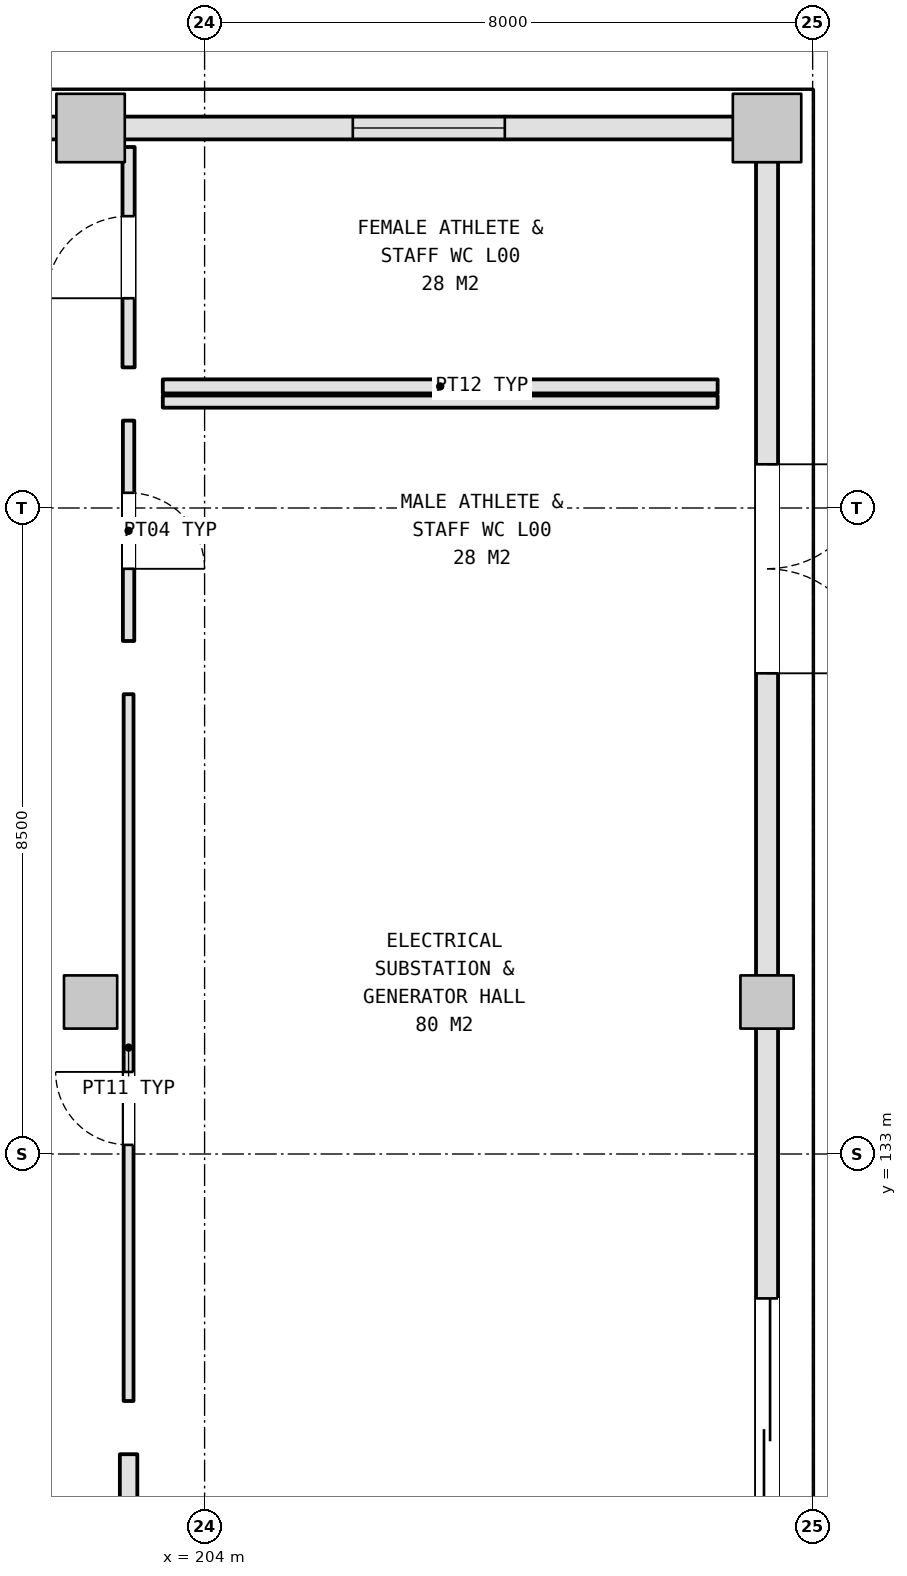
"""IFC4 building model, lengths in metres.
Left out: names, types, materials, properties, quantities, classifications, styles, units other than length and angle.
Written with IfcOpenShell. Run it as: python <this file> out.ifc"""

import sys

from ifc_helpers import new_model, si_unit, direction, frame, frame_2d, origin, origin_2d, place, context, subcontext, project, spatial, rectangle, extrude, element, fill, save


model = new_model("IFC4")
c1 = context("Model", 3, precision=1e-05, world=origin(), true_north=direction((0.0, 1.0)))
c2 = subcontext(c1, "Body", "Model", "MODEL_VIEW")
j1 = project(units=[si_unit("LENGTHUNIT", "METRE"), si_unit("PLANEANGLEUNIT", "RADIAN")], contexts=[c1])
p1 = place(None, origin())
s1 = spatial("IfcSite", under=j1, at=p1, CompositionType="ELEMENT")
p2 = place(p1, origin())
s2 = spatial("IfcBuilding", under=s1, at=p2, CompositionType="ELEMENT")
p3 = place(p2, origin())
s3 = spatial("IfcBuildingStorey", under=s2, at=p3, CompositionType="ELEMENT", Elevation=0.0)
p4 = place(p3, frame((202.5, 135.0, 0.0), z_axis=(0.0, 0.0, 1.0), x_axis=(1.0, 0.0, 0.0)))
e1 = element("IfcColumn", 1, at=p4, inside=s3, PredefinedType="COLUMN", context=c2, shape_type="SweptSolid", body=[
    extrude(rectangle(XDim=0.7, YDim=0.7, at=origin_2d()), origin(), (0.0, 0.0, 1.0), 5.4),
])
p5 = place(p3, frame((202.5, 146.5, 0.0), z_axis=(0.0, 0.0, 1.0), x_axis=(1.0, 0.0, 0.0)))
e2 = element("IfcColumn", 2, at=p5, inside=s3, PredefinedType="COLUMN", context=c2, shape_type="SweptSolid", body=[
    extrude(rectangle(XDim=0.9, YDim=0.9, at=origin_2d()), origin(), (0.0, 0.0, 1.0), 5.4),
])
p6 = place(p3, frame((211.4, 135.0, 0.0), z_axis=(0.0, 0.0, 1.0), x_axis=(1.0, 0.0, 0.0)))
e3 = element("IfcColumn", 3, at=p6, inside=s3, PredefinedType="COLUMN", context=c2, shape_type="SweptSolid", body=[
    extrude(rectangle(XDim=0.7, YDim=0.7, at=origin_2d()), origin(), (0.0, 0.0, 1.0), 5.4),
])
p7 = place(p3, frame((211.4, 146.5, 0.0), z_axis=(0.0, 0.0, 1.0), x_axis=(1.0, 0.0, 0.0)))
e4 = element("IfcColumn", 4, at=p7, inside=s3, PredefinedType="COLUMN", context=c2, shape_type="SweptSolid", body=[
    extrude(rectangle(XDim=0.9, YDim=0.9, at=origin_2d()), origin(), (0.0, 0.0, 1.0), 5.4),
])
p8 = place(p3, frame((211.4, 123.938, 0.0), z_axis=(0.0, 0.0, 1.0), x_axis=(0.0, 1.0, 0.0)))
e5 = element("IfcWall", 5, at=p8, inside=s3, PredefinedType="SOLIDWALL", context=c2, shape_type="SweptSolid", body=[
    extrude(rectangle(XDim=10.724, YDim=0.29, at=frame_2d((5.362, 0.0))), origin(), (0.0, 0.0, 1.0), 4.475),
])
p9 = place(p8, frame((3.562, 0.0, 0.0)))
e6 = element("IfcOpeningElement", 6, at=p9, cuts=e5, PredefinedType="OPENING", context=c2, shape_type="SweptSolid", body=[
    extrude(rectangle(XDim=3.6, YDim=4.0, at=frame_2d((1.8, 2.0))), frame((0.0, 0.155, 0.0), z_axis=(0.0, -1.0, 0.0), x_axis=(1.0, 0.0, 0.0)), (0.0, 0.0, 1.0), 0.31),
])
p10 = place(p3, frame((211.4, 135.338, 0.0), z_axis=(0.0, 0.0, 1.0), x_axis=(0.0, 1.0, 0.0)))
e7 = element("IfcWall", 7, at=p10, inside=s3, PredefinedType="SOLIDWALL", context=c2, shape_type="SweptSolid", body=[
    extrude(rectangle(XDim=10.724, YDim=0.29, at=frame_2d((5.362, 0.0))), origin(), (0.0, 0.0, 1.0), 4.475),
])
p11 = place(p10, frame((3.987, 0.0, 0.0)))
e8 = element("IfcOpeningElement", 8, at=p11, cuts=e7, PredefinedType="OPENING", context=c2, shape_type="SweptSolid", body=[
    extrude(rectangle(XDim=2.75, YDim=2.4, at=frame_2d((1.375, 1.2))), frame((0.0, 0.155, 0.0), z_axis=(0.0, -1.0, 0.0), x_axis=(1.0, 0.0, 0.0)), (0.0, 0.0, 1.0), 0.31),
])
p12 = place(p3, frame((194.038, 146.5, 0.0), z_axis=(0.0, 0.0, 1.0), x_axis=(1.0, 0.0, 0.0)))
e9 = element("IfcWall", 9, at=p12, inside=s3, PredefinedType="SOLIDWALL", context=c2, shape_type="SweptSolid", body=[
    extrude(rectangle(XDim=8.024, YDim=0.3, at=frame_2d((4.012, 0.0))), origin(), (0.0, 0.0, 1.0), 4.715),
])
p13 = place(p12, frame((3.012, 0.0, 1.05)))
e10 = element("IfcOpeningElement", 10, at=p13, cuts=e9, PredefinedType="OPENING", context=c2, shape_type="SweptSolid", body=[
    extrude(rectangle(XDim=2.0, YDim=1.7, at=frame_2d((1.0, 0.85))), frame((0.0, 0.16, 0.0), z_axis=(0.0, -1.0, 0.0), x_axis=(1.0, 0.0, 0.0)), (0.0, 0.0, 1.0), 0.32),
])
p14 = place(p3, frame((202.938, 146.5, 0.0), z_axis=(0.0, 0.0, 1.0), x_axis=(1.0, 0.0, 0.0)))
e11 = element("IfcWall", 11, at=p14, inside=s3, PredefinedType="SOLIDWALL", context=c2, shape_type="SweptSolid", body=[
    extrude(rectangle(XDim=8.024, YDim=0.3, at=frame_2d((4.012, 0.0))), origin(), (0.0, 0.0, 1.0), 4.715),
])
p15 = place(p14, frame((3.012, 0.0, 1.05)))
e12 = element("IfcOpeningElement", 12, at=p15, cuts=e11, PredefinedType="OPENING", context=c2, shape_type="SweptSolid", body=[
    extrude(rectangle(XDim=2.0, YDim=1.7, at=frame_2d((1.0, 0.85))), frame((0.0, 0.16, 0.0), z_axis=(0.0, -1.0, 0.0), x_axis=(1.0, 0.0, 0.0)), (0.0, 0.0, 1.0), 0.32),
])
p16 = place(p3, frame((203.0, 117.75, 0.0), z_axis=(0.0, 0.0, 1.0), x_axis=(0.0, 1.0, 0.0)))
e13 = element("IfcWall", 13, at=p16, inside=s3, PredefinedType="PLUMBINGWALL", context=c2, shape_type="SweptSolid", body=[
    extrude(rectangle(XDim=11.3, YDim=0.23, at=frame_2d((5.65, 0.0))), origin(), (0.0, 0.0, 1.0), 4.625),
])
p17 = place(p16, frame((3.96, 0.0, 0.0)))
e14 = element("IfcOpeningElement", 14, at=p17, cuts=e13, PredefinedType="OPENING", context=c2, shape_type="SweptSolid", body=[
    extrude(rectangle(XDim=0.98, YDim=2.15, at=frame_2d((0.49, 1.075))), frame((0.0, 0.125, 0.0), z_axis=(0.0, -1.0, 0.0), x_axis=(1.0, 0.0, 0.0)), (0.0, 0.0, 1.0), 0.25),
])
p18 = place(p3, frame((203.0, 129.75, 0.0), z_axis=(0.0, 0.0, 1.0), x_axis=(0.0, 1.0, 0.0)))
e15 = element("IfcWall", 15, at=p18, inside=s3, PredefinedType="PARTITIONING", context=c2, shape_type="SweptSolid", body=[
    extrude(rectangle(XDim=9.3, YDim=0.13, at=frame_2d((4.65, 0.0))), origin(), (0.0, 0.0, 1.0), 4.715),
])
p19 = place(p18, frame((3.37, 0.0, 0.0)))
e16 = element("IfcOpeningElement", 16, at=p19, cuts=e15, PredefinedType="OPENING", context=c2, shape_type="SweptSolid", body=[
    extrude(rectangle(XDim=0.96, YDim=2.15, at=frame_2d((0.48, 1.075))), frame((0.0, 0.075, 0.0), z_axis=(0.0, -1.0, 0.0), x_axis=(1.0, 0.0, 0.0)), (0.0, 0.0, 1.0), 0.15),
])
p20 = place(p3, frame((203.0, 139.75, 0.0), z_axis=(0.0, 0.0, 1.0), x_axis=(0.0, 1.0, 0.0)))
e17 = element("IfcWall", 17, at=p20, inside=s3, PredefinedType="PARTITIONING", context=c2, shape_type="SweptSolid", body=[
    extrude(rectangle(XDim=2.9, YDim=0.15, at=frame_2d((1.45, 0.0))), origin(), (0.0, 0.0, 1.0), 4.625),
])
p21 = place(p20, frame((0.95, 0.0, 0.0)))
e18 = element("IfcOpeningElement", 18, at=p21, cuts=e17, PredefinedType="OPENING", context=c2, shape_type="SweptSolid", body=[
    extrude(rectangle(XDim=1.0, YDim=2.15, at=frame_2d((0.5, 1.075))), frame((0.0, 0.085, 0.0), z_axis=(0.0, -1.0, 0.0), x_axis=(1.0, 0.0, 0.0)), (0.0, 0.0, 1.0), 0.17),
])
p22 = place(p3, frame((203.45, 142.9, 0.0), z_axis=(0.0, 0.0, 1.0), x_axis=(1.0, 0.0, 0.0)))
e19 = element("IfcWall", 19, at=p22, inside=s3, PredefinedType="PARTITIONING", context=c2, shape_type="SweptSolid", body=[
    extrude(rectangle(XDim=7.3, YDim=0.16, at=frame_2d((3.65, 0.0))), origin(), (0.0, 0.0, 1.0), 5.12),
])
p23 = place(p3, frame((203.0, 143.35, 0.0), z_axis=(0.0, 0.0, 1.0), x_axis=(0.0, 1.0, 0.0)))
e20 = element("IfcWall", 20, at=p23, inside=s3, PredefinedType="PARTITIONING", context=c2, shape_type="SweptSolid", body=[
    extrude(rectangle(XDim=2.9, YDim=0.16, at=frame_2d((1.45, 0.0))), origin(), (0.0, 0.0, 1.0), 5.12),
])
p24 = place(p23, frame((0.91, 0.0, 0.0)))
e21 = element("IfcOpeningElement", 21, at=p24, cuts=e20, PredefinedType="OPENING", context=c2, shape_type="SweptSolid", body=[
    extrude(rectangle(XDim=1.08, YDim=2.25, at=frame_2d((0.54, 1.125))), frame((0.0, 0.09, 0.0), z_axis=(0.0, -1.0, 0.0), x_axis=(1.0, 0.0, 0.0)), (0.0, 0.0, 1.0), 0.18),
])
p25 = place(p3, frame((210.75, 143.1, 0.0), z_axis=(0.0, 0.0, 1.0), x_axis=(-1.0, 0.0, 0.0)))
e22 = element("IfcWall", 22, at=p25, inside=s3, PredefinedType="PARTITIONING", context=c2, shape_type="SweptSolid", body=[
    extrude(rectangle(XDim=7.3, YDim=0.185, at=frame_2d((3.65, 0.0))), origin(), (0.0, 0.0, 1.0), 5.12),
])
p26 = place(p9, frame((3.6, 0.0, 0.0), z_axis=(0.0, 0.0, 1.0), x_axis=(-1.0, 0.0, 0.0)))
e23 = element("IfcDoor", 23, at=p26, inside=s3, OperationType="ROLLINGUP", PredefinedType="DOOR", context=c2, shape_type="SweptSolid", body=[
    extrude(rectangle(XDim=3.6, YDim=4.0, at=frame_2d((1.8, 2.0))), frame((0.0, 0.025, 0.0), z_axis=(0.0, -1.0, 0.0), x_axis=(1.0, 0.0, 0.0)), (0.0, 0.0, 1.0), 0.05),
])
fill(e6, e23)
p27 = place(p11, frame((2.75, 0.0, 0.0), z_axis=(0.0, 0.0, 1.0), x_axis=(-1.0, 0.0, 0.0)))
e24 = element("IfcDoor", 24, at=p27, inside=s3, OperationType="DOUBLE_DOOR_SINGLE_SWING", PredefinedType="DOOR", context=c2, shape_type="SweptSolid", body=[
    extrude(rectangle(XDim=2.75, YDim=2.4, at=frame_2d((1.375, 1.2))), frame((0.0, 0.025, 0.0), z_axis=(0.0, -1.0, 0.0), x_axis=(1.0, 0.0, 0.0)), (0.0, 0.0, 1.0), 0.05),
])
fill(e8, e24)
p28 = place(p15, origin())
e25 = element("IfcWindow", 25, at=p28, inside=s3, PartitioningType="SINGLE_PANEL", PredefinedType="WINDOW", context=c2, shape_type="SweptSolid", body=[
    extrude(rectangle(XDim=2.0, YDim=1.7, at=frame_2d((1.0, 0.85))), frame((0.0, 0.03, 0.0), z_axis=(0.0, -1.0, 0.0), x_axis=(1.0, 0.0, 0.0)), (0.0, 0.0, 1.0), 0.06),
])
fill(e12, e25)
p29 = place(p19, origin())
e26 = element("IfcDoor", 26, at=p29, inside=s3, OperationType="SINGLE_SWING_RIGHT", PredefinedType="DOOR", context=c2, shape_type="SweptSolid", body=[
    extrude(rectangle(XDim=0.96, YDim=2.15, at=frame_2d((0.48, 1.075))), frame((0.0, 0.025, 0.0), z_axis=(0.0, -1.0, 0.0), x_axis=(1.0, 0.0, 0.0)), (0.0, 0.0, 1.0), 0.05),
])
fill(e16, e26)
p30 = place(p21, frame((1.0, 0.0, 0.0), z_axis=(0.0, 0.0, 1.0), x_axis=(-1.0, 0.0, 0.0)))
e27 = element("IfcDoor", 27, at=p30, inside=s3, OperationType="SINGLE_SWING_LEFT", PredefinedType="DOOR", context=c2, shape_type="SweptSolid", body=[
    extrude(rectangle(XDim=1.0, YDim=2.15, at=frame_2d((0.5, 1.075))), frame((0.0, 0.025, 0.0), z_axis=(0.0, -1.0, 0.0), x_axis=(1.0, 0.0, 0.0)), (0.0, 0.0, 1.0), 0.05),
])
fill(e18, e27)
p31 = place(p24, origin())
e28 = element("IfcDoor", 28, at=p31, inside=s3, OperationType="SINGLE_SWING_LEFT", PredefinedType="DOOR", context=c2, shape_type="SweptSolid", body=[
    extrude(rectangle(XDim=1.08, YDim=2.25, at=frame_2d((0.54, 1.125))), frame((0.0, 0.025, 0.0), z_axis=(0.0, -1.0, 0.0), x_axis=(1.0, 0.0, 0.0)), (0.0, 0.0, 1.0), 0.05),
])
fill(e21, e28)
save(model, sys.argv[1])
